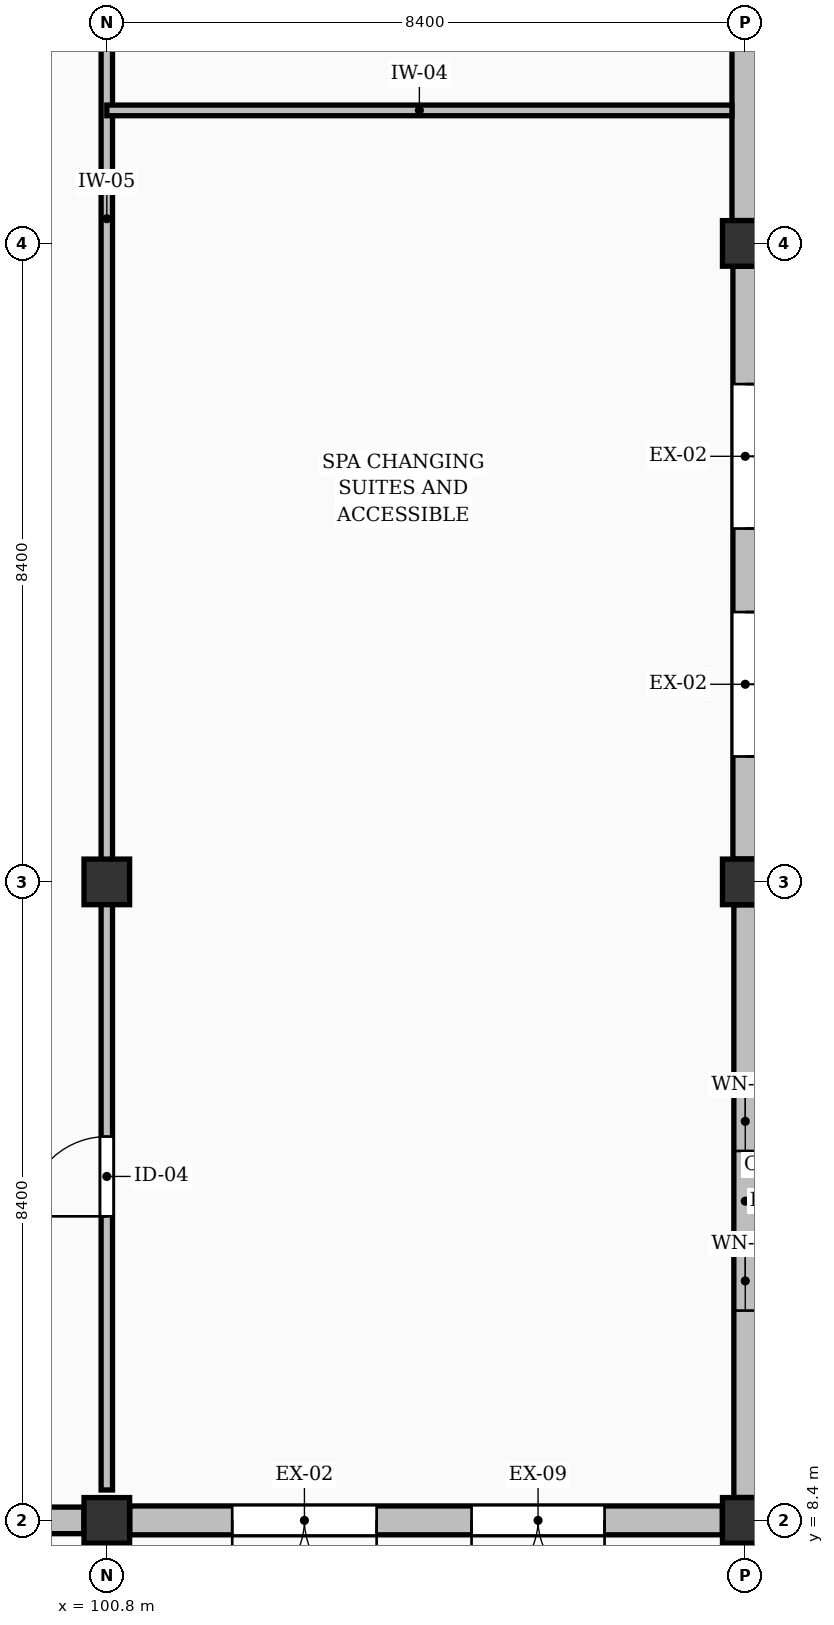
"""IFC4 building model, lengths in metres.
Left out: names, types, materials, properties, quantities, classifications, styles, units other than length and angle.
Written with IfcOpenShell. Run it as: python <this file> out.ifc"""

import sys

from ifc_helpers import new_model, si_unit, direction, frame, frame_2d, origin, origin_2d, place, context, subcontext, project, spatial, rectangle, extrude, element, fill, save


model = new_model("IFC4")
c1 = context("Model", 3, precision=1e-05, world=origin(), true_north=direction((0.0, 1.0)))
c2 = subcontext(c1, "Body", "Model", "MODEL_VIEW")
j1 = project(units=[si_unit("LENGTHUNIT", "METRE"), si_unit("PLANEANGLEUNIT", "RADIAN")], contexts=[c1])
p1 = place(None, origin())
s1 = spatial("IfcSite", under=j1, at=p1, CompositionType="ELEMENT")
p2 = place(p1, origin())
s2 = spatial("IfcBuilding", under=s1, at=p2, CompositionType="ELEMENT")
p3 = place(p2, origin())
s3 = spatial("IfcBuildingStorey", under=s2, at=p3, CompositionType="ELEMENT", Elevation=0.0)
for number, where, z_axis, x_axis in (
    (1, (100.8, 8.4, 0.0), (0.0, 0.0, 1.0), (1.0, 0.0, 0.0)),
    (2, (100.8, 16.8, 0.0), (0.0, 0.0, 1.0), (1.0, 0.0, 0.0)),
    (3, (109.2, 8.4, 0.0), (0.0, 0.0, 1.0), (1.0, 0.0, 0.0)),
    (4, (109.2, 16.8, 0.0), (0.0, 0.0, 1.0), (1.0, 0.0, 0.0)),
    (5, (109.2, 25.2, 0.0), (0.0, 0.0, 1.0), (1.0, 0.0, 0.0)),
):
    element("IfcColumn", number, at=place(p3, frame(where, z_axis=z_axis, x_axis=x_axis)), inside=s3, PredefinedType="COLUMN", context=c2, shape_type="SweptSolid", body=[
        extrude(rectangle(XDim=0.6, YDim=0.6, at=origin_2d()), origin(), (0.0, 0.0, 1.0), 3.92),
    ])
p4 = place(p3, frame((92.701, 8.4, 0.0), z_axis=(0.0, 0.0, 1.0), x_axis=(1.0, 0.0, 0.0)))
e6 = element("IfcWall", 6, at=p4, inside=s3, PredefinedType="SOLIDWALL", context=c2, shape_type="SweptSolid", body=[
    extrude(rectangle(XDim=7.798, YDim=0.35, at=frame_2d((3.899, 0.0))), origin(), (0.0, 0.0, 1.0), 2.825),
])
p5 = place(p4, frame((2.339, 0.0, 0.3)))
e7 = element("IfcOpeningElement", 7, at=p5, cuts=e6, PredefinedType="OPENING", context=c2, shape_type="SweptSolid", body=[
    extrude(rectangle(XDim=1.02, YDim=1.9, at=frame_2d((0.51, 0.95))), frame((0.0, 0.185, 0.0), z_axis=(0.0, -1.0, 0.0), x_axis=(1.0, 0.0, 0.0)), (0.0, 0.0, 1.0), 0.37),
])
p6 = place(p4, frame((4.439, 0.0, 0.3)))
e8 = element("IfcOpeningElement", 8, at=p6, cuts=e6, PredefinedType="OPENING", context=c2, shape_type="SweptSolid", body=[
    extrude(rectangle(XDim=1.02, YDim=1.9, at=frame_2d((0.51, 0.95))), frame((0.0, 0.185, 0.0), z_axis=(0.0, -1.0, 0.0), x_axis=(1.0, 0.0, 0.0)), (0.0, 0.0, 1.0), 0.37),
])
p7 = place(p3, frame((101.101, 8.4, 0.0), z_axis=(0.0, 0.0, 1.0), x_axis=(1.0, 0.0, 0.0)))
e9 = element("IfcWall", 9, at=p7, inside=s3, PredefinedType="SOLIDWALL", context=c2, shape_type="SweptSolid", body=[
    extrude(rectangle(XDim=7.798, YDim=0.38, at=frame_2d((3.899, 0.0))), origin(), (0.0, 0.0, 1.0), 2.825),
])
p8 = place(p7, frame((1.349, 0.0, 0.0)))
e10 = element("IfcOpeningElement", 10, at=p8, cuts=e9, PredefinedType="OPENING", context=c2, shape_type="SweptSolid", body=[
    extrude(rectangle(XDim=1.9, YDim=2.2, at=frame_2d((0.95, 1.1))), frame((0.0, 0.2, 0.0), z_axis=(0.0, -1.0, 0.0), x_axis=(1.0, 0.0, 0.0)), (0.0, 0.0, 1.0), 0.4),
])
p9 = place(p7, frame((4.498, 0.0, 0.0)))
e11 = element("IfcOpeningElement", 11, at=p9, cuts=e9, PredefinedType="OPENING", context=c2, shape_type="SweptSolid", body=[
    extrude(rectangle(XDim=1.75, YDim=2.2, at=frame_2d((0.875, 1.1))), frame((0.0, 0.2, 0.0), z_axis=(0.0, -1.0, 0.0), x_axis=(1.0, 0.0, 0.0)), (0.0, 0.0, 1.0), 0.4),
])
p10 = place(p3, frame((109.2, 8.701, 0.0), z_axis=(0.0, 0.0, 1.0), x_axis=(0.0, 1.0, 0.0)))
e12 = element("IfcWall", 12, at=p10, inside=s3, PredefinedType="SOLIDWALL", context=c2, shape_type="SweptSolid", body=[
    extrude(rectangle(XDim=7.798, YDim=0.3, at=frame_2d((3.899, 0.0))), origin(), (0.0, 0.0, 1.0), 2.775),
])
p11 = place(p10, frame((2.459, 0.0, 0.3)))
e13 = element("IfcOpeningElement", 13, at=p11, cuts=e12, PredefinedType="OPENING", context=c2, shape_type="SweptSolid", body=[
    extrude(rectangle(XDim=0.78, YDim=1.95, at=frame_2d((0.39, 0.975))), frame((0.0, 0.16, 0.0), z_axis=(0.0, -1.0, 0.0), x_axis=(1.0, 0.0, 0.0)), (0.0, 0.0, 1.0), 0.32),
])
p12 = place(p10, frame((4.559, 0.0, 0.3)))
e14 = element("IfcOpeningElement", 14, at=p12, cuts=e12, PredefinedType="OPENING", context=c2, shape_type="SweptSolid", body=[
    extrude(rectangle(XDim=0.78, YDim=1.95, at=frame_2d((0.39, 0.975))), frame((0.0, 0.16, 0.0), z_axis=(0.0, -1.0, 0.0), x_axis=(1.0, 0.0, 0.0)), (0.0, 0.0, 1.0), 0.32),
])
p13 = place(p3, frame((109.2, 17.101, 0.0), z_axis=(0.0, 0.0, 1.0), x_axis=(0.0, 1.0, 0.0)))
e15 = element("IfcWall", 15, at=p13, inside=s3, PredefinedType="SOLIDWALL", context=c2, shape_type="SweptSolid", body=[
    extrude(rectangle(XDim=7.798, YDim=0.325, at=frame_2d((3.899, 0.0))), origin(), (0.0, 0.0, 1.0), 2.675),
])
p14 = place(p13, frame((1.349, 0.0, 0.0)))
e16 = element("IfcOpeningElement", 16, at=p14, cuts=e15, PredefinedType="OPENING", context=c2, shape_type="SweptSolid", body=[
    extrude(rectangle(XDim=1.9, YDim=2.2, at=frame_2d((0.95, 1.1))), frame((0.0, 0.172, 0.0), z_axis=(0.0, -1.0, 0.0), x_axis=(1.0, 0.0, 0.0)), (0.0, 0.0, 1.0), 0.345),
])
p15 = place(p13, frame((4.348, 0.0, 0.0)))
e17 = element("IfcOpeningElement", 17, at=p15, cuts=e15, PredefinedType="OPENING", context=c2, shape_type="SweptSolid", body=[
    extrude(rectangle(XDim=1.9, YDim=2.2, at=frame_2d((0.95, 1.1))), frame((0.0, 0.172, 0.0), z_axis=(0.0, -1.0, 0.0), x_axis=(1.0, 0.0, 0.0)), (0.0, 0.0, 1.0), 0.345),
])
p16 = place(p3, frame((109.2, 25.501, 0.0), z_axis=(0.0, 0.0, 1.0), x_axis=(0.0, 1.0, 0.0)))
e18 = element("IfcWall", 18, at=p16, inside=s3, PredefinedType="SOLIDWALL", context=c2, shape_type="SweptSolid", body=[
    extrude(rectangle(XDim=7.798, YDim=0.35, at=frame_2d((3.899, 0.0))), origin(), (0.0, 0.0, 1.0), 2.975),
])
p17 = place(p16, frame((2.449, 0.0, 0.3)))
e19 = element("IfcOpeningElement", 19, at=p17, cuts=e18, PredefinedType="OPENING", context=c2, shape_type="SweptSolid", body=[
    extrude(rectangle(XDim=0.8, YDim=2.05, at=frame_2d((0.4, 1.025))), frame((0.0, 0.185, 0.0), z_axis=(0.0, -1.0, 0.0), x_axis=(1.0, 0.0, 0.0)), (0.0, 0.0, 1.0), 0.37),
])
p18 = place(p16, frame((4.549, 0.0, 0.3)))
e20 = element("IfcOpeningElement", 20, at=p18, cuts=e18, PredefinedType="OPENING", context=c2, shape_type="SweptSolid", body=[
    extrude(rectangle(XDim=0.8, YDim=2.05, at=frame_2d((0.4, 1.025))), frame((0.0, 0.185, 0.0), z_axis=(0.0, -1.0, 0.0), x_axis=(1.0, 0.0, 0.0)), (0.0, 0.0, 1.0), 0.37),
])
p19 = place(p3, frame((100.8, 8.8, 0.0), z_axis=(0.0, 0.0, 1.0), x_axis=(0.0, 1.0, 0.0)))
e21 = element("IfcWall", 21, at=p19, inside=s3, PredefinedType="PARTITIONING", context=c2, shape_type="SweptSolid", body=[
    extrude(rectangle(XDim=36.4, YDim=0.15, at=frame_2d((18.2, 0.0))), origin(), (0.0, 0.0, 1.0), 2.675),
])
p20 = place(p19, frame((3.6, 0.0, 0.0)))
e22 = element("IfcOpeningElement", 22, at=p20, cuts=e21, PredefinedType="OPENING", context=c2, shape_type="SweptSolid", body=[
    extrude(rectangle(XDim=1.05, YDim=2.15, at=frame_2d((0.525, 1.075))), frame((0.0, 0.085, 0.0), z_axis=(0.0, -1.0, 0.0), x_axis=(1.0, 0.0, 0.0)), (0.0, 0.0, 1.0), 0.17),
])
p21 = place(p19, frame((28.8, 0.0, 0.0)))
e23 = element("IfcOpeningElement", 23, at=p21, cuts=e21, PredefinedType="OPENING", context=c2, shape_type="SweptSolid", body=[
    extrude(rectangle(XDim=1.05, YDim=2.15, at=frame_2d((0.525, 1.075))), frame((0.0, 0.085, 0.0), z_axis=(0.0, -1.0, 0.0), x_axis=(1.0, 0.0, 0.0)), (0.0, 0.0, 1.0), 0.17),
])
p22 = place(p3, frame((100.8, 26.95, 0.0), z_axis=(0.0, 0.0, 1.0), x_axis=(1.0, 0.0, 0.0)))
e24 = element("IfcWall", 24, at=p22, inside=s3, PredefinedType="PARTITIONING", context=c2, shape_type="SweptSolid", body=[
    extrude(rectangle(XDim=8.225, YDim=0.14, at=frame_2d((4.112, 0.0))), origin(), (0.0, 0.0, 1.0), 3.64),
])
p23 = place(p8, frame((1.9, 0.0, 0.0), z_axis=(0.0, 0.0, 1.0), x_axis=(-1.0, 0.0, 0.0)))
e25 = element("IfcDoor", 25, at=p23, inside=s3, OperationType="DOUBLE_DOOR_SINGLE_SWING", PredefinedType="DOOR", context=c2, shape_type="SweptSolid", body=[
    extrude(rectangle(XDim=1.9, YDim=2.2, at=frame_2d((0.95, 1.1))), frame((0.0, 0.025, 0.0), z_axis=(0.0, -1.0, 0.0), x_axis=(1.0, 0.0, 0.0)), (0.0, 0.0, 1.0), 0.05),
])
fill(e10, e25)
p24 = place(p9, frame((1.75, 0.0, 0.0), z_axis=(0.0, 0.0, 1.0), x_axis=(-1.0, 0.0, 0.0)))
e26 = element("IfcDoor", 26, at=p24, inside=s3, OperationType="DOUBLE_DOOR_SINGLE_SWING", PredefinedType="DOOR", context=c2, shape_type="SweptSolid", body=[
    extrude(rectangle(XDim=1.75, YDim=2.2, at=frame_2d((0.875, 1.1))), frame((0.0, 0.025, 0.0), z_axis=(0.0, -1.0, 0.0), x_axis=(1.0, 0.0, 0.0)), (0.0, 0.0, 1.0), 0.05),
])
fill(e11, e26)
p25 = place(p11, origin())
e27 = element("IfcWindow", 27, at=p25, inside=s3, PartitioningType="SINGLE_PANEL", PredefinedType="WINDOW", context=c2, shape_type="SweptSolid", body=[
    extrude(rectangle(XDim=0.78, YDim=1.95, at=frame_2d((0.39, 0.975))), frame((0.0, 0.03, 0.0), z_axis=(0.0, -1.0, 0.0), x_axis=(1.0, 0.0, 0.0)), (0.0, 0.0, 1.0), 0.06),
])
fill(e13, e27)
p26 = place(p12, origin())
e28 = element("IfcWindow", 28, at=p26, inside=s3, PartitioningType="SINGLE_PANEL", PredefinedType="WINDOW", context=c2, shape_type="SweptSolid", body=[
    extrude(rectangle(XDim=0.78, YDim=1.95, at=frame_2d((0.39, 0.975))), frame((0.0, 0.03, 0.0), z_axis=(0.0, -1.0, 0.0), x_axis=(1.0, 0.0, 0.0)), (0.0, 0.0, 1.0), 0.06),
])
fill(e14, e28)
p27 = place(p14, frame((1.9, 0.0, 0.0), z_axis=(0.0, 0.0, 1.0), x_axis=(-1.0, 0.0, 0.0)))
e29 = element("IfcDoor", 29, at=p27, inside=s3, OperationType="DOUBLE_DOOR_SINGLE_SWING", PredefinedType="DOOR", context=c2, shape_type="SweptSolid", body=[
    extrude(rectangle(XDim=1.9, YDim=2.2, at=frame_2d((0.95, 1.1))), frame((0.0, 0.025, 0.0), z_axis=(0.0, -1.0, 0.0), x_axis=(1.0, 0.0, 0.0)), (0.0, 0.0, 1.0), 0.05),
])
fill(e16, e29)
p28 = place(p15, frame((1.9, 0.0, 0.0), z_axis=(0.0, 0.0, 1.0), x_axis=(-1.0, 0.0, 0.0)))
e30 = element("IfcDoor", 30, at=p28, inside=s3, OperationType="DOUBLE_DOOR_SINGLE_SWING", PredefinedType="DOOR", context=c2, shape_type="SweptSolid", body=[
    extrude(rectangle(XDim=1.9, YDim=2.2, at=frame_2d((0.95, 1.1))), frame((0.0, 0.025, 0.0), z_axis=(0.0, -1.0, 0.0), x_axis=(1.0, 0.0, 0.0)), (0.0, 0.0, 1.0), 0.05),
])
fill(e17, e30)
p29 = place(p20, origin())
e31 = element("IfcDoor", 31, at=p29, inside=s3, OperationType="SINGLE_SWING_LEFT", PredefinedType="DOOR", context=c2, shape_type="SweptSolid", body=[
    extrude(rectangle(XDim=1.05, YDim=2.15, at=frame_2d((0.525, 1.075))), frame((0.0, 0.025, 0.0), z_axis=(0.0, -1.0, 0.0), x_axis=(1.0, 0.0, 0.0)), (0.0, 0.0, 1.0), 0.05),
])
fill(e22, e31)
save(model, sys.argv[1])
